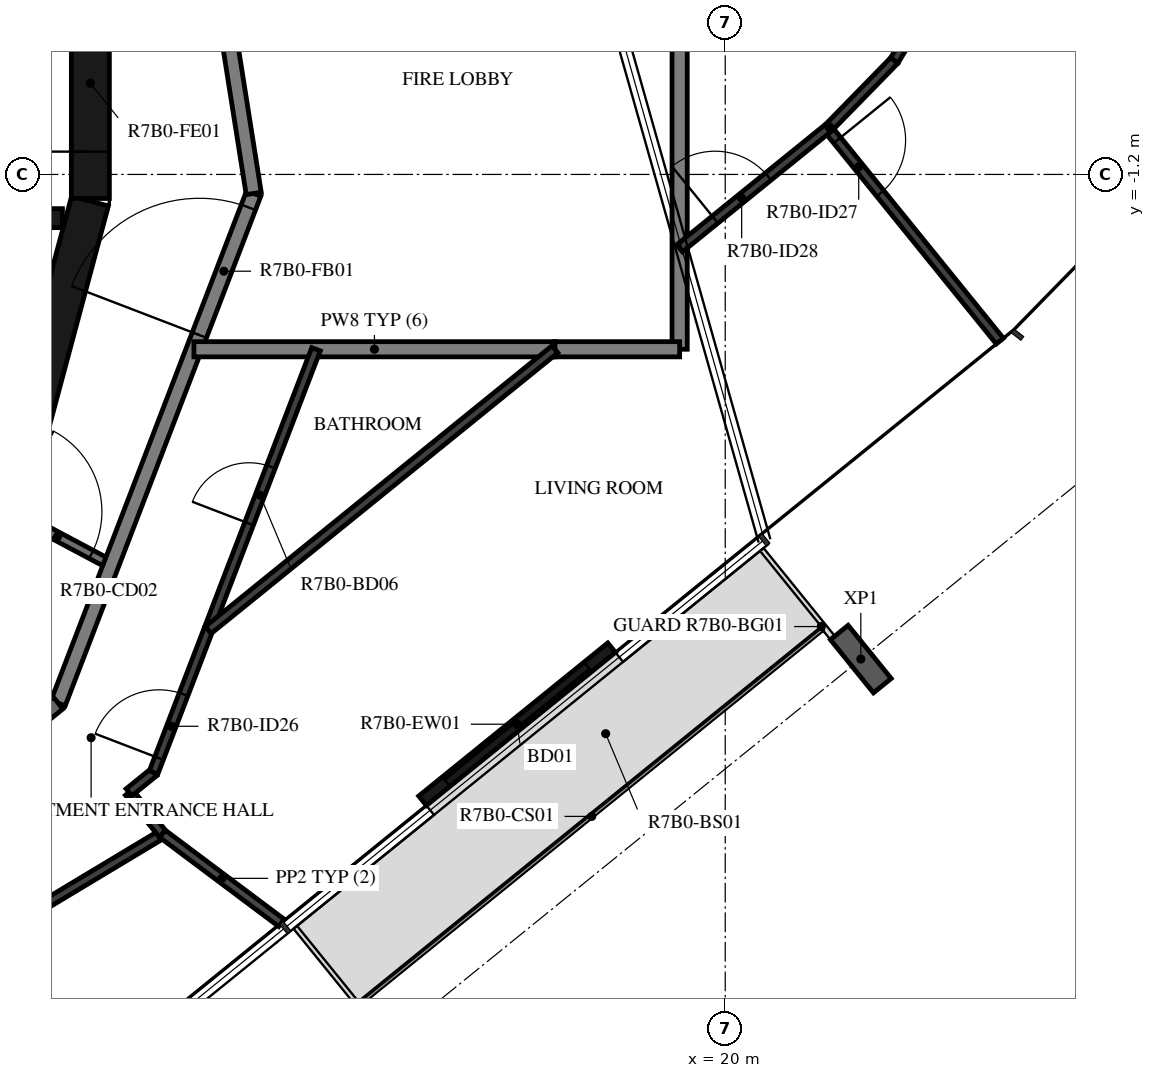
"""IFC4 building model, lengths in metres.
Left out: names, types, materials, properties, quantities, classifications, styles, units other than length and angle.
Written with IfcOpenShell. Run it as: python <this file> out.ifc"""

import sys

from ifc_helpers import new_model, si_unit, direction, frame, frame_2d, origin, origin_2d, place, context, subcontext, project, spatial, rectangle, i_section, extrude, element, fill, save


model = new_model("IFC4")
c1 = context("Model", 3, precision=1e-05, world=origin(), true_north=direction((0.0, 1.0)))
c2 = subcontext(c1, "Body", "Model", "MODEL_VIEW")
j1 = project(units=[si_unit("LENGTHUNIT", "METRE"), si_unit("PLANEANGLEUNIT", "RADIAN")], contexts=[c1])
p1 = place(None, origin())
s1 = spatial("IfcSite", under=j1, at=p1, CompositionType="ELEMENT")
p2 = place(p1, origin())
s2 = spatial("IfcBuilding", under=s1, at=p2, CompositionType="ELEMENT")
p3 = place(p2, frame((0.0, 0.0, 277.4)))
s3 = spatial("IfcBuildingStorey", under=s2, at=p3, CompositionType="ELEMENT", Elevation=277.4)
p4 = place(p3, frame((21.784, -7.576, -0.38), z_axis=(0.0, 0.0, 1.0), x_axis=(-0.777146167973, -0.629320136024, 0.0)))
e1 = element("IfcColumn", 1, at=p4, inside=s3, PredefinedType="COLUMN", context=c2, shape_type="SweptSolid", body=[
    extrude(i_section(OverallWidth=0.3, OverallDepth=0.9, WebThickness=0.019, FlangeThickness=0.035, FilletRadius=0.03, at=origin_2d()), origin(), (0.0, 0.0, 1.0), 3.5),
])
p5 = place(p3, frame((16.018, -9.44, 0.0), z_axis=(0.0, 0.0, 1.0), x_axis=(0.777125818, 0.629345265333, 0.0)))
e2 = element("IfcWall", 2, at=p5, inside=s3, PredefinedType="STANDARD", context=c2, shape_type="SweptSolid", body=[
    extrude(rectangle(XDim=3.2, YDim=0.16, at=frame_2d((1.6, 0.0))), origin(), (0.0, 0.0, 1.0), 3.12),
])
p6 = place(p5, frame((0.4, 0.0, 0.0)))
e3 = element("IfcOpeningElement", 3, at=p6, cuts=e2, PredefinedType="OPENING", context=c2, shape_type="SweptSolid", body=[
    extrude(rectangle(XDim=2.4, YDim=2.4, at=frame_2d((1.2, 1.2))), frame((0.0, 0.09, 0.0), z_axis=(0.0, -1.0, 0.0), x_axis=(1.0, 0.0, 0.0)), (0.0, 0.0, 1.0), 0.18),
])
p7 = place(p3, frame((10.858, -4.479, 0.0), z_axis=(0.0, 0.0, 1.0), x_axis=(0.258734743916, 0.965948410781, 0.0)))
e4 = element("IfcWall", 4, at=p7, inside=s3, PredefinedType="SHEAR", context=c2, shape_type="SweptSolid", body=[
    extrude(rectangle(XDim=3.033, YDim=0.5, at=frame_2d((1.516, 0.0))), origin(), (0.0, 0.0, 1.0), 3.12),
])
p8 = place(p3, frame((11.647, -1.516, 0.0), z_axis=(0.0, 0.0, 1.0), x_axis=(0.0, 1.0, 0.0)))
e5 = element("IfcWall", 5, at=p8, inside=s3, PredefinedType="SHEAR", context=c2, shape_type="SweptSolid", body=[
    extrude(rectangle(XDim=3.033, YDim=0.5, at=frame_2d((1.516, 0.0))), origin(), (0.0, 0.0, 1.0), 3.12),
])
p9 = place(p8, frame((0.616, 0.0, 0.0)))
e6 = element("IfcOpeningElement", 6, at=p9, cuts=e5, PredefinedType="OPENING", context=c2, shape_type="SweptSolid", body=[
    extrude(rectangle(XDim=1.8, YDim=2.1, at=frame_2d((0.9, 1.05))), frame((0.0, 0.26, 0.0), z_axis=(0.0, -1.0, 0.0), x_axis=(1.0, 0.0, 0.0)), (0.0, 0.0, 1.0), 0.52),
])
p10 = place(p3, frame((3.35, -1.775, 0.0), z_axis=(0.0, 0.0, 1.0), x_axis=(1.0, 0.0, 0.0)))
e7 = element("IfcWall", 7, at=p10, inside=s3, PredefinedType="SHEAR", context=c2, shape_type="SweptSolid", body=[
    extrude(rectangle(XDim=7.93, YDim=0.25, at=frame_2d((3.965, 0.0))), origin(), (0.0, 0.0, 1.0), 3.12),
])
p11 = place(p10, frame((0.4, 0.0, 0.0)))
e8 = element("IfcOpeningElement", 8, at=p11, cuts=e7, PredefinedType="OPENING", context=c2, shape_type="SweptSolid", body=[
    extrude(rectangle(XDim=1.1, YDim=2.4, at=frame_2d((0.55, 1.2))), frame((0.0, 0.135, 0.0), z_axis=(0.0, -1.0, 0.0), x_axis=(1.0, 0.0, 0.0)), (0.0, 0.0, 1.0), 0.27),
])
p12 = place(p10, frame((2.55, 0.0, 0.0)))
e9 = element("IfcOpeningElement", 9, at=p12, cuts=e7, PredefinedType="OPENING", context=c2, shape_type="SweptSolid", body=[
    extrude(rectangle(XDim=1.1, YDim=2.4, at=frame_2d((0.55, 1.2))), frame((0.0, 0.135, 0.0), z_axis=(0.0, -1.0, 0.0), x_axis=(1.0, 0.0, 0.0)), (0.0, 0.0, 1.0), 0.27),
])
p13 = place(p10, frame((4.7, 0.0, 0.0)))
e10 = element("IfcOpeningElement", 10, at=p13, cuts=e7, PredefinedType="OPENING", context=c2, shape_type="SweptSolid", body=[
    extrude(rectangle(XDim=1.1, YDim=2.4, at=frame_2d((0.55, 1.2))), frame((0.0, 0.135, 0.0), z_axis=(0.0, -1.0, 0.0), x_axis=(1.0, 0.0, 0.0)), (0.0, 0.0, 1.0), 0.27),
])
p14 = place(p3, frame((10.511, -5.589, 0.0), z_axis=(0.0, 0.0, 1.0), x_axis=(0.882983002821, -0.469404960273, 0.0)))
e11 = element("IfcWall", 11, at=p14, inside=s3, PredefinedType="PARTITIONING", context=c2, shape_type="SweptSolid", body=[
    extrude(rectangle(XDim=1.596, YDim=0.12, at=frame_2d((0.798, 0.0))), origin(), (0.0, 0.0, 1.0), 3.12),
])
p15 = place(p14, frame((0.1, 0.0, 0.0)))
e12 = element("IfcOpeningElement", 12, at=p15, cuts=e11, PredefinedType="OPENING", context=c2, shape_type="SweptSolid", body=[
    extrude(rectangle(XDim=1.2, YDim=2.1, at=frame_2d((0.6, 1.05))), frame((0.0, 0.07, 0.0), z_axis=(0.0, -1.0, 0.0), x_axis=(1.0, 0.0, 0.0)), (0.0, 0.0, 1.0), 0.14),
])
p16 = place(p3, frame((11.223, -8.154, 0.0), z_axis=(0.0, 0.0, 1.0), x_axis=(0.358341090983, 0.93359073609, 0.0)))
e13 = element("IfcWall", 13, at=p16, inside=s3, PredefinedType="STANDARD", context=c2, shape_type="SweptSolid", body=[
    extrude(rectangle(XDim=7.181, YDim=0.2, at=frame_2d((3.59, 0.0))), origin(), (0.0, 0.0, 1.0), 3.12),
])
p17 = place(p16, frame((5.185, 0.0, 0.0)))
e14 = element("IfcOpeningElement", 14, at=p17, cuts=e13, PredefinedType="OPENING", context=c2, shape_type="SweptSolid", body=[
    extrude(rectangle(XDim=1.8, YDim=2.1, at=frame_2d((0.9, 1.05))), frame((0.0, 0.11, 0.0), z_axis=(0.0, -1.0, 0.0), x_axis=(1.0, 0.0, 0.0)), (0.0, 0.0, 1.0), 0.22),
])
p18 = place(p3, frame((13.797, -1.45, 0.0), z_axis=(0.0, 0.0, 1.0), x_axis=(-0.156421704315, 0.987690361611, 0.0)))
e15 = element("IfcWall", 15, at=p18, inside=s3, PredefinedType="STANDARD", context=c2, shape_type="SweptSolid", body=[
    extrude(rectangle(XDim=7.181, YDim=0.2, at=frame_2d((3.591, 0.0))), origin(), (0.0, 0.0, 1.0), 3.12),
])
p19 = place(p3, frame((5.643, -12.673, 0.0), z_axis=(0.0, 0.0, 1.0), x_axis=(0.777160148113, 0.629302871585, 0.0)))
e16 = element("IfcWall", 16, at=p19, inside=s3, PredefinedType="STANDARD", context=c2, shape_type="SweptSolid", body=[
    extrude(rectangle(XDim=7.181, YDim=0.2, at=frame_2d((3.59, 0.0))), origin(), (0.0, 0.0, 1.0), 3.12),
])
p20 = place(p19, frame((0.2, 0.0, 0.0)))
e17 = element("IfcOpeningElement", 17, at=p20, cuts=e16, PredefinedType="OPENING", context=c2, shape_type="SweptSolid", body=[
    extrude(rectangle(XDim=1.0, YDim=2.1, at=frame_2d((0.5, 1.05))), frame((0.0, 0.11, 0.0), z_axis=(0.0, -1.0, 0.0), x_axis=(1.0, 0.0, 0.0)), (0.0, 0.0, 1.0), 0.22),
])
p21 = place(p3, frame((13.01, -3.5, 0.0), z_axis=(0.0, 0.0, 1.0), x_axis=(1.0, 0.0, 0.0)))
e18 = element("IfcWall", 18, at=p21, inside=s3, PredefinedType="STANDARD", context=c2, shape_type="SweptSolid", body=[
    extrude(rectangle(XDim=4.75, YDim=0.2, at=frame_2d((2.375, 0.0))), origin(), (0.0, 0.0, 1.0), 3.12),
])
p22 = place(p3, frame((19.4, -3.5, 0.0), z_axis=(0.0, 0.0, 1.0), x_axis=(0.0, 1.0, 0.0)))
e19 = element("IfcWall", 19, at=p22, inside=s3, PredefinedType="STANDARD", context=c2, shape_type="SweptSolid", body=[
    extrude(rectangle(XDim=5.021, YDim=0.2, at=frame_2d((2.511, 0.0))), origin(), (0.0, 0.0, 1.0), 3.12),
])
p23 = place(p3, frame((17.76, -3.5, 0.0), z_axis=(0.0, 0.0, 1.0), x_axis=(1.0, 0.0, 0.0)))
e20 = element("IfcWall", 20, at=p23, inside=s3, PredefinedType="STANDARD", context=c2, shape_type="SweptSolid", body=[
    extrude(rectangle(XDim=1.64, YDim=0.2, at=frame_2d((0.82, 0.0))), origin(), (0.0, 0.0, 1.0), 3.12),
])
p24 = place(p3, frame((10.434, -11.175, 0.0), z_axis=(0.0, 0.0, 1.0), x_axis=(0.857117202926, 0.515121442427, 0.0)))
e21 = element("IfcWall", 21, at=p24, inside=s3, PredefinedType="PARTITIONING", context=c2, shape_type="SweptSolid", body=[
    extrude(rectangle(XDim=2.524, YDim=0.12, at=frame_2d((1.262, 0.0))), origin(), (0.0, 0.0, 1.0), 3.12),
])
p25 = place(p3, frame((12.597, -9.875, 0.0), z_axis=(0.0, 0.0, 1.0), x_axis=(-0.629138198612, 0.77729346263, 0.0)))
e22 = element("IfcWall", 22, at=p25, inside=s3, PredefinedType="PARTITIONING", context=c2, shape_type="SweptSolid", body=[
    extrude(rectangle(XDim=0.702, YDim=0.12, at=frame_2d((0.351, 0.0))), origin(), (0.0, 0.0, 1.0), 3.12),
])
p26 = place(p3, frame((12.156, -9.329, 0.0), z_axis=(0.0, 0.0, 1.0), x_axis=(0.777026645941, 0.629467704888, 0.0)))
e23 = element("IfcWall", 23, at=p26, inside=s3, PredefinedType="PARTITIONING", context=c2, shape_type="SweptSolid", body=[
    extrude(rectangle(XDim=0.417, YDim=0.12, at=frame_2d((0.208, 0.0))), origin(), (0.0, 0.0, 1.0), 3.12),
])
p27 = place(p3, frame((12.479, -9.067, 0.0), z_axis=(0.0, 0.0, 1.0), x_axis=(0.358372669661, 0.933578614601, 0.0)))
e24 = element("IfcWall", 24, at=p27, inside=s3, PredefinedType="PARTITIONING", context=c2, shape_type="SweptSolid", body=[
    extrude(rectangle(XDim=5.963, YDim=0.12, at=frame_2d((2.981, 0.0))), origin(), (0.0, 0.0, 1.0), 3.12),
])
p28 = place(p27, frame((0.2, 0.0, 0.0)))
e25 = element("IfcOpeningElement", 25, at=p28, cuts=e24, PredefinedType="OPENING", context=c2, shape_type="SweptSolid", body=[
    extrude(rectangle(XDim=0.9, YDim=2.1, at=frame_2d((0.45, 1.05))), frame((0.0, 0.07, 0.0), z_axis=(0.0, -1.0, 0.0), x_axis=(1.0, 0.0, 0.0)), (0.0, 0.0, 1.0), 0.14),
])
p29 = place(p27, frame((3.507, 0.0, 0.0)))
e26 = element("IfcOpeningElement", 26, at=p29, cuts=e24, PredefinedType="OPENING", context=c2, shape_type="SweptSolid", body=[
    extrude(rectangle(XDim=0.8, YDim=2.1, at=frame_2d((0.4, 1.05))), frame((0.0, 0.07, 0.0), z_axis=(0.0, -1.0, 0.0), x_axis=(1.0, 0.0, 0.0)), (0.0, 0.0, 1.0), 0.14),
])
p30 = place(p3, frame((22.746, 1.168, 0.0), z_axis=(0.0, 0.0, 1.0), x_axis=(-0.515096534995, -0.857132171626, 0.0)))
e27 = element("IfcWall", 27, at=p30, inside=s3, PredefinedType="PARTITIONING", context=c2, shape_type="SweptSolid", body=[
    extrude(rectangle(XDim=1.016, YDim=0.12, at=frame_2d((0.508, 0.0))), origin(), (0.0, 0.0, 1.0), 3.12),
])
p31 = place(p3, frame((22.223, 0.298, 0.0), z_axis=(0.0, 0.0, 1.0), x_axis=(-0.69880109182, -0.715316037896, 0.0)))
e28 = element("IfcWall", 28, at=p31, inside=s3, PredefinedType="PARTITIONING", context=c2, shape_type="SweptSolid", body=[
    extrude(rectangle(XDim=1.227, YDim=0.12, at=frame_2d((0.614, 0.0))), origin(), (0.0, 0.0, 1.0), 3.12),
])
p32 = place(p3, frame((21.347, -0.595, 0.0), z_axis=(0.0, 0.0, 1.0), x_axis=(0.62934843781, -0.7771232488, 0.0)))
e29 = element("IfcWall", 29, at=p32, inside=s3, PredefinedType="PARTITIONING", context=c2, shape_type="SweptSolid", body=[
    extrude(rectangle(XDim=3.6, YDim=0.12, at=frame_2d((1.8, 0.0))), origin(), (0.0, 0.0, 1.0), 3.12),
])
p33 = place(p32, frame((0.2, 0.0, 0.0)))
e30 = element("IfcOpeningElement", 30, at=p33, cuts=e29, PredefinedType="OPENING", context=c2, shape_type="SweptSolid", body=[
    extrude(rectangle(XDim=0.9, YDim=2.1, at=frame_2d((0.45, 1.05))), frame((0.0, 0.07, 0.0), z_axis=(0.0, -1.0, 0.0), x_axis=(1.0, 0.0, 0.0)), (0.0, 0.0, 1.0), 0.14),
])
p34 = place(p3, frame((19.4, -2.172, 0.0), z_axis=(0.0, 0.0, 1.0), x_axis=(0.777147279935, 0.629318762862, 0.0)))
e31 = element("IfcWall", 31, at=p34, inside=s3, PredefinedType="PARTITIONING", context=c2, shape_type="SweptSolid", body=[
    extrude(rectangle(XDim=2.505, YDim=0.12, at=frame_2d((1.253, 0.0))), origin(), (0.0, 0.0, 1.0), 3.12),
])
p35 = place(p34, frame((0.6, 0.0, 0.0)))
e32 = element("IfcOpeningElement", 32, at=p35, cuts=e31, PredefinedType="OPENING", context=c2, shape_type="SweptSolid", body=[
    extrude(rectangle(XDim=0.9, YDim=2.1, at=frame_2d((0.45, 1.05))), frame((0.0, 0.07, 0.0), z_axis=(0.0, -1.0, 0.0), x_axis=(1.0, 0.0, 0.0)), (0.0, 0.0, 1.0), 0.14),
])
p36 = place(p3, frame((14.161, -11.046, 0.0), z_axis=(0.0, 0.0, 1.0), x_axis=(-0.800434550749, 0.599420161463, 0.0)))
e33 = element("IfcWall", 33, at=p36, inside=s3, PredefinedType="PARTITIONING", context=c2, shape_type="SweptSolid", body=[
    extrude(rectangle(XDim=1.954, YDim=0.12, at=frame_2d((0.977, 0.0))), origin(), (0.0, 0.0, 1.0), 2.73),
])
p37 = place(p3, frame((17.76, -3.5, 0.0), z_axis=(0.0, 0.0, 1.0), x_axis=(-0.777133455716, -0.62933583404, 0.0)))
e34 = element("IfcWall", 34, at=p37, inside=s3, PredefinedType="PARTITIONING", context=c2, shape_type="SweptSolid", body=[
    extrude(rectangle(XDim=5.869, YDim=0.12, at=frame_2d((2.935, 0.0))), origin(), (0.0, 0.0, 1.0), 3.12),
])
p38 = place(p6, origin())
e35 = element("IfcDoor", 35, at=p38, inside=s3, OperationType="DOUBLE_DOOR_SLIDING", PredefinedType="DOOR", context=c2, shape_type="SweptSolid", body=[
    extrude(rectangle(XDim=2.4, YDim=2.4, at=frame_2d((1.2, 1.2))), frame((0.0, 0.025, 0.0), z_axis=(0.0, -1.0, 0.0), x_axis=(1.0, 0.0, 0.0)), (0.0, 0.0, 1.0), 0.05),
])
fill(e3, e35)
p39 = place(p9, origin())
e36 = element("IfcDoor", 36, at=p39, inside=s3, OperationType="DOUBLE_DOOR_SINGLE_SWING", PredefinedType="DOOR", context=c2, shape_type="SweptSolid", body=[
    extrude(rectangle(XDim=1.8, YDim=2.1, at=frame_2d((0.9, 1.05))), frame((0.0, 0.025, 0.0), z_axis=(0.0, -1.0, 0.0), x_axis=(1.0, 0.0, 0.0)), (0.0, 0.0, 1.0), 0.05),
])
fill(e6, e36)
p40 = place(p28, origin())
e37 = element("IfcDoor", 37, at=p40, inside=s3, OperationType="SINGLE_SWING_RIGHT", PredefinedType="DOOR", context=c2, shape_type="SweptSolid", body=[
    extrude(rectangle(XDim=0.9, YDim=2.1, at=frame_2d((0.45, 1.05))), frame((0.0, 0.025, 0.0), z_axis=(0.0, -1.0, 0.0), x_axis=(1.0, 0.0, 0.0)), (0.0, 0.0, 1.0), 0.05),
])
fill(e25, e37)
p41 = place(p29, origin())
e38 = element("IfcDoor", 38, at=p41, inside=s3, OperationType="SINGLE_SWING_RIGHT", PredefinedType="DOOR", context=c2, shape_type="SweptSolid", body=[
    extrude(rectangle(XDim=0.8, YDim=2.1, at=frame_2d((0.4, 1.05))), frame((0.0, 0.025, 0.0), z_axis=(0.0, -1.0, 0.0), x_axis=(1.0, 0.0, 0.0)), (0.0, 0.0, 1.0), 0.05),
])
fill(e26, e38)
p42 = place(p33, origin())
e39 = element("IfcDoor", 39, at=p42, inside=s3, OperationType="SINGLE_SWING_RIGHT", PredefinedType="DOOR", context=c2, shape_type="SweptSolid", body=[
    extrude(rectangle(XDim=0.9, YDim=2.1, at=frame_2d((0.45, 1.05))), frame((0.0, 0.025, 0.0), z_axis=(0.0, -1.0, 0.0), x_axis=(1.0, 0.0, 0.0)), (0.0, 0.0, 1.0), 0.05),
])
fill(e30, e39)
p43 = place(p35, origin())
e40 = element("IfcDoor", 40, at=p43, inside=s3, OperationType="SINGLE_SWING_LEFT", PredefinedType="DOOR", context=c2, shape_type="SweptSolid", body=[
    extrude(rectangle(XDim=0.9, YDim=2.1, at=frame_2d((0.45, 1.05))), frame((0.0, 0.025, 0.0), z_axis=(0.0, -1.0, 0.0), x_axis=(1.0, 0.0, 0.0)), (0.0, 0.0, 1.0), 0.05),
])
fill(e32, e40)
p44 = place(p15, origin())
e41 = element("IfcDoor", 41, at=p44, inside=s3, OperationType="DOUBLE_DOOR_SINGLE_SWING", PredefinedType="DOOR", context=c2, shape_type="SweptSolid", body=[
    extrude(rectangle(XDim=1.2, YDim=2.1, at=frame_2d((0.6, 1.05))), frame((0.0, 0.025, 0.0), z_axis=(0.0, -1.0, 0.0), x_axis=(1.0, 0.0, 0.0)), (0.0, 0.0, 1.0), 0.05),
])
fill(e12, e41)
p45 = place(p17, origin())
e42 = element("IfcDoor", 42, at=p45, inside=s3, OperationType="DOUBLE_DOOR_SINGLE_SWING", PredefinedType="DOOR", context=c2, shape_type="SweptSolid", body=[
    extrude(rectangle(XDim=1.8, YDim=2.1, at=frame_2d((0.9, 1.05))), frame((0.0, 0.025, 0.0), z_axis=(0.0, -1.0, 0.0), x_axis=(1.0, 0.0, 0.0)), (0.0, 0.0, 1.0), 0.05),
])
fill(e14, e42)
save(model, sys.argv[1])
